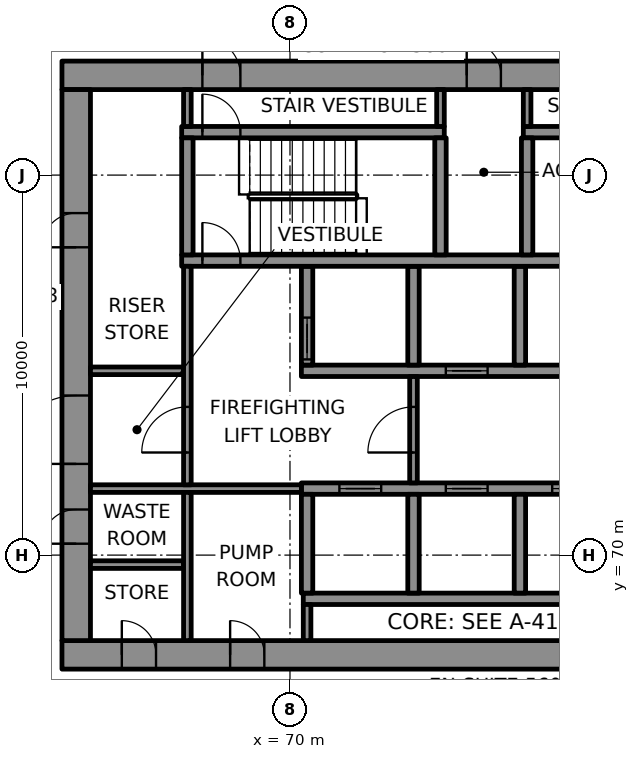
"""IFC4 building model, lengths in metres.
Left out: names, types, materials, properties, quantities, classifications, styles, units other than length and angle.
Written with IfcOpenShell. Run it as: python <this file> out.ifc"""

import sys

from ifc_helpers import new_model, si_unit, direction, frame, frame_2d, origin, place, context, subcontext, project, spatial, rectangle, extrude, element, fill, save


model = new_model("IFC4")
c1 = context("Model", 3, precision=1e-05, world=origin(), true_north=direction((0.0, 1.0)))
c2 = subcontext(c1, "Body", "Model", "MODEL_VIEW")
j1 = project(units=[si_unit("LENGTHUNIT", "METRE"), si_unit("PLANEANGLEUNIT", "RADIAN")], contexts=[c1])
p1 = place(None, origin())
s1 = spatial("IfcSite", under=j1, at=p1, CompositionType="ELEMENT")
p2 = place(p1, origin())
s2 = spatial("IfcBuilding", under=s1, at=p2, CompositionType="ELEMENT")
p3 = place(p2, frame((0.0, 0.0, 237.7)))
s3 = spatial("IfcBuildingStorey", under=s2, at=p3, CompositionType="ELEMENT", Elevation=237.7)
p4 = place(p3, frame((64.0, 67.375, 0.0), z_axis=(0.0, 0.0, 1.0), x_axis=(1.0, 0.0, 0.0)))
e1 = element("IfcWall", 1, at=p4, inside=s3, PredefinedType="SHEAR", context=c2, shape_type="SweptSolid", body=[
    extrude(rectangle(XDim=22.0, YDim=0.75, at=frame_2d((11.0, 0.0))), origin(), (0.0, 0.0, 1.0), 3.6),
])
p5 = place(p4, frame((1.575, 0.0, 0.0)))
e2 = element("IfcOpeningElement", 2, at=p5, cuts=e1, PredefinedType="OPENING", context=c2, shape_type="SweptSolid", body=[
    extrude(rectangle(XDim=0.9, YDim=2.1, at=frame_2d((0.45, 1.05))), frame((0.0, 0.385, 0.0), z_axis=(0.0, -1.0, 0.0), x_axis=(1.0, 0.0, 0.0)), (0.0, 0.0, 1.0), 0.77),
])
p6 = place(p4, frame((4.425, 0.0, 0.0)))
e3 = element("IfcOpeningElement", 3, at=p6, cuts=e1, PredefinedType="OPENING", context=c2, shape_type="SweptSolid", body=[
    extrude(rectangle(XDim=0.9, YDim=2.1, at=frame_2d((0.45, 1.05))), frame((0.0, 0.385, 0.0), z_axis=(0.0, -1.0, 0.0), x_axis=(1.0, 0.0, 0.0)), (0.0, 0.0, 1.0), 0.77),
])
p7 = place(p3, frame((64.0, 82.625, 0.0), z_axis=(0.0, 0.0, 1.0), x_axis=(1.0, 0.0, 0.0)))
e4 = element("IfcWall", 4, at=p7, inside=s3, PredefinedType="SHEAR", context=c2, shape_type="SweptSolid", body=[
    extrude(rectangle(XDim=22.0, YDim=0.75, at=frame_2d((11.0, 0.0))), origin(), (0.0, 0.0, 1.0), 3.6),
])
p8 = place(p7, frame((3.695, 0.0, 0.0)))
e5 = element("IfcOpeningElement", 5, at=p8, cuts=e4, PredefinedType="OPENING", context=c2, shape_type="SweptSolid", body=[
    extrude(rectangle(XDim=1.0, YDim=2.1, at=frame_2d((0.5, 1.05))), frame((0.0, 0.385, 0.0), z_axis=(0.0, -1.0, 0.0), x_axis=(1.0, 0.0, 0.0)), (0.0, 0.0, 1.0), 0.77),
])
p9 = place(p7, frame((17.505, 0.0, 0.0)))
e6 = element("IfcOpeningElement", 6, at=p9, cuts=e4, PredefinedType="OPENING", context=c2, shape_type="SweptSolid", body=[
    extrude(rectangle(XDim=1.0, YDim=2.1, at=frame_2d((0.5, 1.05))), frame((0.0, 0.385, 0.0), z_axis=(0.0, -1.0, 0.0), x_axis=(1.0, 0.0, 0.0)), (0.0, 0.0, 1.0), 0.77),
])
p10 = place(p7, frame((10.65, 0.0, 0.0)))
e7 = element("IfcOpeningElement", 7, at=p10, cuts=e4, PredefinedType="OPENING", context=c2, shape_type="SweptSolid", body=[
    extrude(rectangle(XDim=0.9, YDim=2.1, at=frame_2d((0.45, 1.05))), frame((0.0, 0.385, 0.0), z_axis=(0.0, -1.0, 0.0), x_axis=(1.0, 0.0, 0.0)), (0.0, 0.0, 1.0), 0.77),
])
p11 = place(p3, frame((64.375, 67.75, 0.0), z_axis=(0.0, 0.0, 1.0), x_axis=(0.0, 1.0, 0.0)))
e8 = element("IfcWall", 8, at=p11, inside=s3, PredefinedType="SHEAR", context=c2, shape_type="SweptSolid", body=[
    extrude(rectangle(XDim=14.5, YDim=0.75, at=frame_2d((7.25, 0.0))), origin(), (0.0, 0.0, 1.0), 3.6),
])
p12 = place(p11, frame((4.65, 0.0, 0.0)))
e9 = element("IfcOpeningElement", 9, at=p12, cuts=e8, PredefinedType="OPENING", context=c2, shape_type="SweptSolid", body=[
    extrude(rectangle(XDim=1.8, YDim=2.1, at=frame_2d((0.9, 1.05))), frame((0.0, 0.385, 0.0), z_axis=(0.0, -1.0, 0.0), x_axis=(1.0, 0.0, 0.0)), (0.0, 0.0, 1.0), 0.77),
])
p13 = place(p11, frame((2.55, 0.0, 0.0)))
e10 = element("IfcOpeningElement", 10, at=p13, cuts=e8, PredefinedType="OPENING", context=c2, shape_type="SweptSolid", body=[
    extrude(rectangle(XDim=0.9, YDim=2.1, at=frame_2d((0.45, 1.05))), frame((0.0, 0.385, 0.0), z_axis=(0.0, -1.0, 0.0), x_axis=(1.0, 0.0, 0.0)), (0.0, 0.0, 1.0), 0.77),
])
p14 = place(p11, frame((10.35, 0.0, 0.0)))
e11 = element("IfcOpeningElement", 11, at=p14, cuts=e8, PredefinedType="OPENING", context=c2, shape_type="SweptSolid", body=[
    extrude(rectangle(XDim=0.9, YDim=2.1, at=frame_2d((0.45, 1.05))), frame((0.0, 0.385, 0.0), z_axis=(0.0, -1.0, 0.0), x_axis=(1.0, 0.0, 0.0)), (0.0, 0.0, 1.0), 0.77),
])
p15 = place(p3, frame((70.35, 68.85, 0.0), z_axis=(0.0, 0.0, 1.0), x_axis=(1.0, 0.0, 0.0)))
e12 = element("IfcWall", 12, at=p15, inside=s3, PredefinedType="SHEAR", context=c2, shape_type="SweptSolid", body=[
    extrude(rectangle(XDim=14.2, YDim=0.3, at=frame_2d((7.1, 0.0))), origin(), (0.0, 0.0, 1.0), 3.6),
])
p16 = place(p3, frame((70.3, 71.75, 0.0), z_axis=(0.0, 0.0, 1.0), x_axis=(1.0, 0.0, 0.0)))
e13 = element("IfcWall", 13, at=p16, inside=s3, PredefinedType="SHEAR", context=c2, shape_type="SweptSolid", body=[
    extrude(rectangle(XDim=14.3, YDim=0.3, at=frame_2d((7.15, 0.0))), origin(), (0.0, 0.0, 1.0), 3.6),
])
p17 = place(p16, frame((1.0, 0.0, 0.0)))
e14 = element("IfcOpeningElement", 14, at=p17, cuts=e13, PredefinedType="OPENING", context=c2, shape_type="SweptSolid", body=[
    extrude(rectangle(XDim=1.1, YDim=2.1, at=frame_2d((0.55, 1.05))), frame((0.0, 0.16, 0.0), z_axis=(0.0, -1.0, 0.0), x_axis=(1.0, 0.0, 0.0)), (0.0, 0.0, 1.0), 0.32),
])
p18 = place(p16, frame((3.8, 0.0, 0.0)))
e15 = element("IfcOpeningElement", 15, at=p18, cuts=e13, PredefinedType="OPENING", context=c2, shape_type="SweptSolid", body=[
    extrude(rectangle(XDim=1.1, YDim=2.1, at=frame_2d((0.55, 1.05))), frame((0.0, 0.16, 0.0), z_axis=(0.0, -1.0, 0.0), x_axis=(1.0, 0.0, 0.0)), (0.0, 0.0, 1.0), 0.32),
])
p19 = place(p16, frame((6.6, 0.0, 0.0)))
e16 = element("IfcOpeningElement", 16, at=p19, cuts=e13, PredefinedType="OPENING", context=c2, shape_type="SweptSolid", body=[
    extrude(rectangle(XDim=1.1, YDim=2.1, at=frame_2d((0.55, 1.05))), frame((0.0, 0.16, 0.0), z_axis=(0.0, -1.0, 0.0), x_axis=(1.0, 0.0, 0.0)), (0.0, 0.0, 1.0), 0.32),
])
p20 = place(p16, frame((9.4, 0.0, 0.0)))
e17 = element("IfcOpeningElement", 17, at=p20, cuts=e13, PredefinedType="OPENING", context=c2, shape_type="SweptSolid", body=[
    extrude(rectangle(XDim=1.1, YDim=2.1, at=frame_2d((0.55, 1.05))), frame((0.0, 0.16, 0.0), z_axis=(0.0, -1.0, 0.0), x_axis=(1.0, 0.0, 0.0)), (0.0, 0.0, 1.0), 0.32),
])
p21 = place(p16, frame((12.2, 0.0, 0.0)))
e18 = element("IfcOpeningElement", 18, at=p21, cuts=e13, PredefinedType="OPENING", context=c2, shape_type="SweptSolid", body=[
    extrude(rectangle(XDim=1.1, YDim=2.1, at=frame_2d((0.55, 1.05))), frame((0.0, 0.16, 0.0), z_axis=(0.0, -1.0, 0.0), x_axis=(1.0, 0.0, 0.0)), (0.0, 0.0, 1.0), 0.32),
])
p22 = place(p3, frame((70.3, 74.85, 0.0), z_axis=(0.0, 0.0, 1.0), x_axis=(1.0, 0.0, 0.0)))
e19 = element("IfcWall", 19, at=p22, inside=s3, PredefinedType="SHEAR", context=c2, shape_type="SweptSolid", body=[
    extrude(rectangle(XDim=14.3, YDim=0.3, at=frame_2d((7.15, 0.0))), origin(), (0.0, 0.0, 1.0), 3.6),
])
p23 = place(p22, frame((3.8, 0.0, 0.0)))
e20 = element("IfcOpeningElement", 20, at=p23, cuts=e19, PredefinedType="OPENING", context=c2, shape_type="SweptSolid", body=[
    extrude(rectangle(XDim=1.1, YDim=2.1, at=frame_2d((0.55, 1.05))), frame((0.0, 0.16, 0.0), z_axis=(0.0, -1.0, 0.0), x_axis=(1.0, 0.0, 0.0)), (0.0, 0.0, 1.0), 0.32),
])
p24 = place(p22, frame((12.2, 0.0, 0.0)))
e21 = element("IfcOpeningElement", 21, at=p24, cuts=e19, PredefinedType="OPENING", context=c2, shape_type="SweptSolid", body=[
    extrude(rectangle(XDim=1.1, YDim=2.1, at=frame_2d((0.55, 1.05))), frame((0.0, 0.16, 0.0), z_axis=(0.0, -1.0, 0.0), x_axis=(1.0, 0.0, 0.0)), (0.0, 0.0, 1.0), 0.32),
])
p25 = place(p3, frame((70.45, 69.0, 0.0), z_axis=(0.0, 0.0, 1.0), x_axis=(0.0, 1.0, 0.0)))
e22 = element("IfcWall", 22, at=p25, inside=s3, PredefinedType="SHEAR", context=c2, shape_type="SweptSolid", body=[
    extrude(rectangle(XDim=2.6, YDim=0.3, at=frame_2d((1.3, 0.0))), origin(), (0.0, 0.0, 1.0), 3.6),
])
p26 = place(p3, frame((70.45, 75.0, 0.0), z_axis=(0.0, 0.0, 1.0), x_axis=(0.0, 1.0, 0.0)))
e23 = element("IfcWall", 23, at=p26, inside=s3, PredefinedType="SHEAR", context=c2, shape_type="SweptSolid", body=[
    extrude(rectangle(XDim=2.6, YDim=0.3, at=frame_2d((1.3, 0.0))), origin(), (0.0, 0.0, 1.0), 3.6),
])
p27 = place(p26, frame((0.15, 0.0, 0.0)))
e24 = element("IfcOpeningElement", 24, at=p27, cuts=e23, PredefinedType="OPENING", context=c2, shape_type="SweptSolid", body=[
    extrude(rectangle(XDim=1.1, YDim=2.1, at=frame_2d((0.55, 1.05))), frame((0.0, 0.16, 0.0), z_axis=(0.0, -1.0, 0.0), x_axis=(1.0, 0.0, 0.0)), (0.0, 0.0, 1.0), 0.32),
])
for number, where, z_axis, x_axis in (
    (25, (73.25, 69.0, 0.0), (0.0, 0.0, 1.0), (0.0, 1.0, 0.0)),
    (26, (73.25, 75.0, 0.0), (0.0, 0.0, 1.0), (0.0, 1.0, 0.0)),
    (27, (76.05, 69.0, 0.0), (0.0, 0.0, 1.0), (0.0, 1.0, 0.0)),
    (28, (76.05, 75.0, 0.0), (0.0, 0.0, 1.0), (0.0, 1.0, 0.0)),
):
    element("IfcWall", number, at=place(p3, frame(where, z_axis=z_axis, x_axis=x_axis)), inside=s3, PredefinedType="SHEAR", context=c2, shape_type="SweptSolid", body=[
        extrude(rectangle(XDim=2.6, YDim=0.3, at=frame_2d((1.3, 0.0))), origin(), (0.0, 0.0, 1.0), 3.6),
    ])
p28 = place(p3, frame((67.15, 77.75, 0.0), z_axis=(0.0, 0.0, 1.0), x_axis=(1.0, 0.0, 0.0)))
e29 = element("IfcWall", 29, at=p28, inside=s3, PredefinedType="SHEAR", context=c2, shape_type="SweptSolid", body=[
    extrude(rectangle(XDim=17.45, YDim=0.3, at=frame_2d((8.725, 0.0))), origin(), (0.0, 0.0, 1.0), 3.6),
])
p29 = place(p28, frame((0.545, 0.0, 0.0)))
e30 = element("IfcOpeningElement", 30, at=p29, cuts=e29, PredefinedType="OPENING", context=c2, shape_type="SweptSolid", body=[
    extrude(rectangle(XDim=1.0, YDim=2.1, at=frame_2d((0.5, 1.05))), frame((0.0, 0.16, 0.0), z_axis=(0.0, -1.0, 0.0), x_axis=(1.0, 0.0, 0.0)), (0.0, 0.0, 1.0), 0.32),
])
p30 = place(p3, frame((67.15, 81.13, 0.0), z_axis=(0.0, 0.0, 1.0), x_axis=(1.0, 0.0, 0.0)))
e31 = element("IfcWall", 31, at=p30, inside=s3, PredefinedType="SHEAR", context=c2, shape_type="SweptSolid", body=[
    extrude(rectangle(XDim=6.91, YDim=0.3, at=frame_2d((3.455, 0.0))), origin(), (0.0, 0.0, 1.0), 3.6),
])
p31 = place(p30, frame((0.545, 0.0, 0.0)))
e32 = element("IfcOpeningElement", 32, at=p31, cuts=e31, PredefinedType="OPENING", context=c2, shape_type="SweptSolid", body=[
    extrude(rectangle(XDim=1.0, YDim=2.1, at=frame_2d((0.5, 1.05))), frame((0.0, 0.16, 0.0), z_axis=(0.0, -1.0, 0.0), x_axis=(1.0, 0.0, 0.0)), (0.0, 0.0, 1.0), 0.32),
])
p32 = place(p3, frame((76.14, 81.13, 0.0), z_axis=(0.0, 0.0, 1.0), x_axis=(1.0, 0.0, 0.0)))
e33 = element("IfcWall", 33, at=p32, inside=s3, PredefinedType="SHEAR", context=c2, shape_type="SweptSolid", body=[
    extrude(rectangle(XDim=6.86, YDim=0.3, at=frame_2d((3.43, 0.0))), origin(), (0.0, 0.0, 1.0), 3.6),
])
p33 = place(p32, frame((5.365, 0.0, 0.0)))
e34 = element("IfcOpeningElement", 34, at=p33, cuts=e33, PredefinedType="OPENING", context=c2, shape_type="SweptSolid", body=[
    extrude(rectangle(XDim=1.0, YDim=2.1, at=frame_2d((0.5, 1.05))), frame((0.0, 0.16, 0.0), z_axis=(0.0, -1.0, 0.0), x_axis=(1.0, 0.0, 0.0)), (0.0, 0.0, 1.0), 0.32),
])
for number, where, z_axis, x_axis in (
    (35, (67.3, 77.9, 0.0), (0.0, 0.0, 1.0), (0.0, 1.0, 0.0)),
    (36, (73.96, 77.9, 0.0), (0.0, 0.0, 1.0), (0.0, 1.0, 0.0)),
    (37, (76.24, 77.9, 0.0), (0.0, 0.0, 1.0), (0.0, 1.0, 0.0)),
):
    element("IfcWall", number, at=place(p3, frame(where, z_axis=z_axis, x_axis=x_axis)), inside=s3, PredefinedType="SHEAR", context=c2, shape_type="SweptSolid", body=[
        extrude(rectangle(XDim=3.08, YDim=0.3, at=frame_2d((1.54, 0.0))), origin(), (0.0, 0.0, 1.0), 3.6),
    ])
p34 = place(p3, frame((64.75, 69.75, 0.0), z_axis=(0.0, 0.0, 1.0), x_axis=(1.0, 0.0, 0.0)))
e38 = element("IfcWall", 38, at=p34, inside=s3, PredefinedType="PARTITIONING", context=c2, shape_type="SweptSolid", body=[
    extrude(rectangle(XDim=2.45, YDim=0.2, at=frame_2d((1.225, 0.0))), origin(), (0.0, 0.0, 1.0), 3.6),
])
p35 = place(p3, frame((64.75, 71.75, 0.0), z_axis=(0.0, 0.0, 1.0), x_axis=(1.0, 0.0, 0.0)))
e39 = element("IfcWall", 39, at=p35, inside=s3, PredefinedType="PARTITIONING", context=c2, shape_type="SweptSolid", body=[
    extrude(rectangle(XDim=5.55, YDim=0.2, at=frame_2d((2.775, 0.0))), origin(), (0.0, 0.0, 1.0), 3.6),
])
p36 = place(p3, frame((64.75, 74.85, 0.0), z_axis=(0.0, 0.0, 1.0), x_axis=(1.0, 0.0, 0.0)))
e40 = element("IfcWall", 40, at=p36, inside=s3, PredefinedType="PARTITIONING", context=c2, shape_type="SweptSolid", body=[
    extrude(rectangle(XDim=2.45, YDim=0.2, at=frame_2d((1.225, 0.0))), origin(), (0.0, 0.0, 1.0), 3.6),
])
p37 = place(p3, frame((67.3, 67.75, 0.0), z_axis=(0.0, 0.0, 1.0), x_axis=(0.0, 1.0, 0.0)))
e41 = element("IfcWall", 41, at=p37, inside=s3, PredefinedType="PARTITIONING", context=c2, shape_type="SweptSolid", body=[
    extrude(rectangle(XDim=3.9, YDim=0.2, at=frame_2d((1.95, 0.0))), origin(), (0.0, 0.0, 1.0), 3.6),
])
p38 = place(p3, frame((67.3, 71.85, 0.0), z_axis=(0.0, 0.0, 1.0), x_axis=(0.0, 1.0, 0.0)))
e42 = element("IfcWall", 42, at=p38, inside=s3, PredefinedType="PARTITIONING", context=c2, shape_type="SweptSolid", body=[
    extrude(rectangle(XDim=5.75, YDim=0.2, at=frame_2d((2.875, 0.0))), origin(), (0.0, 0.0, 1.0), 3.6),
])
p39 = place(p38, frame((0.85, 0.0, 0.0)))
e43 = element("IfcOpeningElement", 43, at=p39, cuts=e42, PredefinedType="OPENING", context=c2, shape_type="SweptSolid", body=[
    extrude(rectangle(XDim=1.2, YDim=2.1, at=frame_2d((0.6, 1.05))), frame((0.0, 0.11, 0.0), z_axis=(0.0, -1.0, 0.0), x_axis=(1.0, 0.0, 0.0)), (0.0, 0.0, 1.0), 0.22),
])
p40 = place(p3, frame((67.3, 81.28, 0.0), z_axis=(0.0, 0.0, 1.0), x_axis=(0.0, 1.0, 0.0)))
e44 = element("IfcWall", 44, at=p40, inside=s3, PredefinedType="PARTITIONING", context=c2, shape_type="SweptSolid", body=[
    extrude(rectangle(XDim=0.97, YDim=0.2, at=frame_2d((0.485, 0.0))), origin(), (0.0, 0.0, 1.0), 3.6),
])
p41 = place(p3, frame((70.45, 67.75, 0.0), z_axis=(0.0, 0.0, 1.0), x_axis=(0.0, 1.0, 0.0)))
e45 = element("IfcWall", 45, at=p41, inside=s3, PredefinedType="PARTITIONING", context=c2, shape_type="SweptSolid", body=[
    extrude(rectangle(XDim=0.95, YDim=0.2, at=frame_2d((0.475, 0.0))), origin(), (0.0, 0.0, 1.0), 3.6),
])
p42 = place(p3, frame((73.25, 71.9, 0.0), z_axis=(0.0, 0.0, 1.0), x_axis=(0.0, 1.0, 0.0)))
e46 = element("IfcWall", 46, at=p42, inside=s3, PredefinedType="PARTITIONING", context=c2, shape_type="SweptSolid", body=[
    extrude(rectangle(XDim=2.8, YDim=0.2, at=frame_2d((1.4, 0.0))), origin(), (0.0, 0.0, 1.0), 3.6),
])
p43 = place(p42, frame((0.8, 0.0, 0.0)))
e47 = element("IfcOpeningElement", 47, at=p43, cuts=e46, PredefinedType="OPENING", context=c2, shape_type="SweptSolid", body=[
    extrude(rectangle(XDim=1.2, YDim=2.1, at=frame_2d((0.6, 1.05))), frame((0.0, 0.11, 0.0), z_axis=(0.0, -1.0, 0.0), x_axis=(1.0, 0.0, 0.0)), (0.0, 0.0, 1.0), 0.22),
])
for number, where, z_axis, x_axis in (
    (48, (73.96, 81.28, 0.0), (0.0, 0.0, 1.0), (0.0, 1.0, 0.0)),
    (49, (76.24, 81.28, 0.0), (0.0, 0.0, 1.0), (0.0, 1.0, 0.0)),
):
    element("IfcWall", number, at=place(p3, frame(where, z_axis=z_axis, x_axis=x_axis)), inside=s3, PredefinedType="PARTITIONING", context=c2, shape_type="SweptSolid", body=[
        extrude(rectangle(XDim=0.97, YDim=0.2, at=frame_2d((0.485, 0.0))), origin(), (0.0, 0.0, 1.0), 3.6),
    ])
p44 = place(p17, origin())
e50 = element("IfcDoor", 50, at=p44, inside=s3, OperationType="DOUBLE_DOOR_SLIDING", PredefinedType="DOOR", context=c2, shape_type="SweptSolid", body=[
    extrude(rectangle(XDim=1.1, YDim=2.1, at=frame_2d((0.55, 1.05))), frame((0.0, 0.025, 0.0), z_axis=(0.0, -1.0, 0.0), x_axis=(1.0, 0.0, 0.0)), (0.0, 0.0, 1.0), 0.05),
])
fill(e14, e50)
p45 = place(p18, origin())
e51 = element("IfcDoor", 51, at=p45, inside=s3, OperationType="DOUBLE_DOOR_SLIDING", PredefinedType="DOOR", context=c2, shape_type="SweptSolid", body=[
    extrude(rectangle(XDim=1.1, YDim=2.1, at=frame_2d((0.55, 1.05))), frame((0.0, 0.025, 0.0), z_axis=(0.0, -1.0, 0.0), x_axis=(1.0, 0.0, 0.0)), (0.0, 0.0, 1.0), 0.05),
])
fill(e15, e51)
p46 = place(p19, origin())
e52 = element("IfcDoor", 52, at=p46, inside=s3, OperationType="DOUBLE_DOOR_SLIDING", PredefinedType="DOOR", context=c2, shape_type="SweptSolid", body=[
    extrude(rectangle(XDim=1.1, YDim=2.1, at=frame_2d((0.55, 1.05))), frame((0.0, 0.025, 0.0), z_axis=(0.0, -1.0, 0.0), x_axis=(1.0, 0.0, 0.0)), (0.0, 0.0, 1.0), 0.05),
])
fill(e16, e52)
p47 = place(p27, origin())
e53 = element("IfcDoor", 53, at=p47, inside=s3, OperationType="DOUBLE_DOOR_SLIDING", PredefinedType="DOOR", context=c2, shape_type="SweptSolid", body=[
    extrude(rectangle(XDim=1.1, YDim=2.1, at=frame_2d((0.55, 1.05))), frame((0.0, 0.025, 0.0), z_axis=(0.0, -1.0, 0.0), x_axis=(1.0, 0.0, 0.0)), (0.0, 0.0, 1.0), 0.05),
])
fill(e24, e53)
p48 = place(p23, origin())
e54 = element("IfcDoor", 54, at=p48, inside=s3, OperationType="DOUBLE_DOOR_SLIDING", PredefinedType="DOOR", context=c2, shape_type="SweptSolid", body=[
    extrude(rectangle(XDim=1.1, YDim=2.1, at=frame_2d((0.55, 1.05))), frame((0.0, 0.025, 0.0), z_axis=(0.0, -1.0, 0.0), x_axis=(1.0, 0.0, 0.0)), (0.0, 0.0, 1.0), 0.05),
])
fill(e20, e54)
p49 = place(p29, origin())
e55 = element("IfcDoor", 55, at=p49, inside=s3, OperationType="SINGLE_SWING_LEFT", PredefinedType="DOOR", context=c2, shape_type="SweptSolid", body=[
    extrude(rectangle(XDim=1.0, YDim=2.1, at=frame_2d((0.5, 1.05))), frame((0.0, 0.025, 0.0), z_axis=(0.0, -1.0, 0.0), x_axis=(1.0, 0.0, 0.0)), (0.0, 0.0, 1.0), 0.05),
])
fill(e30, e55)
p50 = place(p31, origin())
e56 = element("IfcDoor", 56, at=p50, inside=s3, OperationType="SINGLE_SWING_RIGHT", PredefinedType="DOOR", context=c2, shape_type="SweptSolid", body=[
    extrude(rectangle(XDim=1.0, YDim=2.1, at=frame_2d((0.5, 1.05))), frame((0.0, 0.025, 0.0), z_axis=(0.0, -1.0, 0.0), x_axis=(1.0, 0.0, 0.0)), (0.0, 0.0, 1.0), 0.05),
])
fill(e32, e56)
p51 = place(p8, origin())
e57 = element("IfcDoor", 57, at=p51, inside=s3, OperationType="SINGLE_SWING_LEFT", PredefinedType="DOOR", context=c2, shape_type="SweptSolid", body=[
    extrude(rectangle(XDim=1.0, YDim=2.1, at=frame_2d((0.5, 1.05))), frame((0.0, 0.095, 0.0), z_axis=(0.0, -1.0, 0.0), x_axis=(1.0, 0.0, 0.0)), (0.0, 0.0, 1.0), 0.19),
])
fill(e5, e57)
p52 = place(p43, origin())
e58 = element("IfcDoor", 58, at=p52, inside=s3, OperationType="SINGLE_SWING_LEFT", PredefinedType="DOOR", context=c2, shape_type="SweptSolid", body=[
    extrude(rectangle(XDim=1.2, YDim=2.1, at=frame_2d((0.6, 1.05))), frame((0.0, 0.025, 0.0), z_axis=(0.0, -1.0, 0.0), x_axis=(1.0, 0.0, 0.0)), (0.0, 0.0, 1.0), 0.05),
])
fill(e47, e58)
p53 = place(p39, origin())
e59 = element("IfcDoor", 59, at=p53, inside=s3, OperationType="SINGLE_SWING_RIGHT", PredefinedType="DOOR", context=c2, shape_type="SweptSolid", body=[
    extrude(rectangle(XDim=1.2, YDim=2.1, at=frame_2d((0.6, 1.05))), frame((0.0, 0.025, 0.0), z_axis=(0.0, -1.0, 0.0), x_axis=(1.0, 0.0, 0.0)), (0.0, 0.0, 1.0), 0.05),
])
fill(e43, e59)
p54 = place(p12, origin())
e60 = element("IfcDoor", 60, at=p54, inside=s3, OperationType="SINGLE_SWING_LEFT", PredefinedType="DOOR", context=c2, shape_type="SweptSolid", body=[
    extrude(rectangle(XDim=1.8, YDim=2.1, at=frame_2d((0.9, 1.05))), frame((0.0, 0.095, 0.0), z_axis=(0.0, -1.0, 0.0), x_axis=(1.0, 0.0, 0.0)), (0.0, 0.0, 1.0), 0.19),
])
fill(e9, e60)
p55 = place(p5, origin())
e61 = element("IfcDoor", 61, at=p55, inside=s3, OperationType="SINGLE_SWING_LEFT", PredefinedType="DOOR", context=c2, shape_type="SweptSolid", body=[
    extrude(rectangle(XDim=0.9, YDim=2.1, at=frame_2d((0.45, 1.05))), frame((0.0, 0.095, 0.0), z_axis=(0.0, -1.0, 0.0), x_axis=(1.0, 0.0, 0.0)), (0.0, 0.0, 1.0), 0.19),
])
fill(e2, e61)
p56 = place(p13, origin())
e62 = element("IfcDoor", 62, at=p56, inside=s3, OperationType="SINGLE_SWING_RIGHT", PredefinedType="DOOR", context=c2, shape_type="SweptSolid", body=[
    extrude(rectangle(XDim=0.9, YDim=2.1, at=frame_2d((0.45, 1.05))), frame((0.0, 0.095, 0.0), z_axis=(0.0, -1.0, 0.0), x_axis=(1.0, 0.0, 0.0)), (0.0, 0.0, 1.0), 0.19),
])
fill(e10, e62)
p57 = place(p6, origin())
e63 = element("IfcDoor", 63, at=p57, inside=s3, OperationType="SINGLE_SWING_LEFT", PredefinedType="DOOR", context=c2, shape_type="SweptSolid", body=[
    extrude(rectangle(XDim=0.9, YDim=2.1, at=frame_2d((0.45, 1.05))), frame((0.0, 0.095, 0.0), z_axis=(0.0, -1.0, 0.0), x_axis=(1.0, 0.0, 0.0)), (0.0, 0.0, 1.0), 0.19),
])
fill(e3, e63)
p58 = place(p14, origin())
e64 = element("IfcDoor", 64, at=p58, inside=s3, OperationType="SINGLE_SWING_RIGHT", PredefinedType="DOOR", context=c2, shape_type="SweptSolid", body=[
    extrude(rectangle(XDim=0.9, YDim=2.1, at=frame_2d((0.45, 1.05))), frame((0.0, 0.095, 0.0), z_axis=(0.0, -1.0, 0.0), x_axis=(1.0, 0.0, 0.0)), (0.0, 0.0, 1.0), 0.19),
])
fill(e11, e64)
p59 = place(p10, origin())
e65 = element("IfcDoor", 65, at=p59, inside=s3, OperationType="SINGLE_SWING_LEFT", PredefinedType="DOOR", context=c2, shape_type="SweptSolid", body=[
    extrude(rectangle(XDim=0.9, YDim=2.1, at=frame_2d((0.45, 1.05))), frame((0.0, 0.095, 0.0), z_axis=(0.0, -1.0, 0.0), x_axis=(1.0, 0.0, 0.0)), (0.0, 0.0, 1.0), 0.19),
])
fill(e7, e65)
save(model, sys.argv[1])
